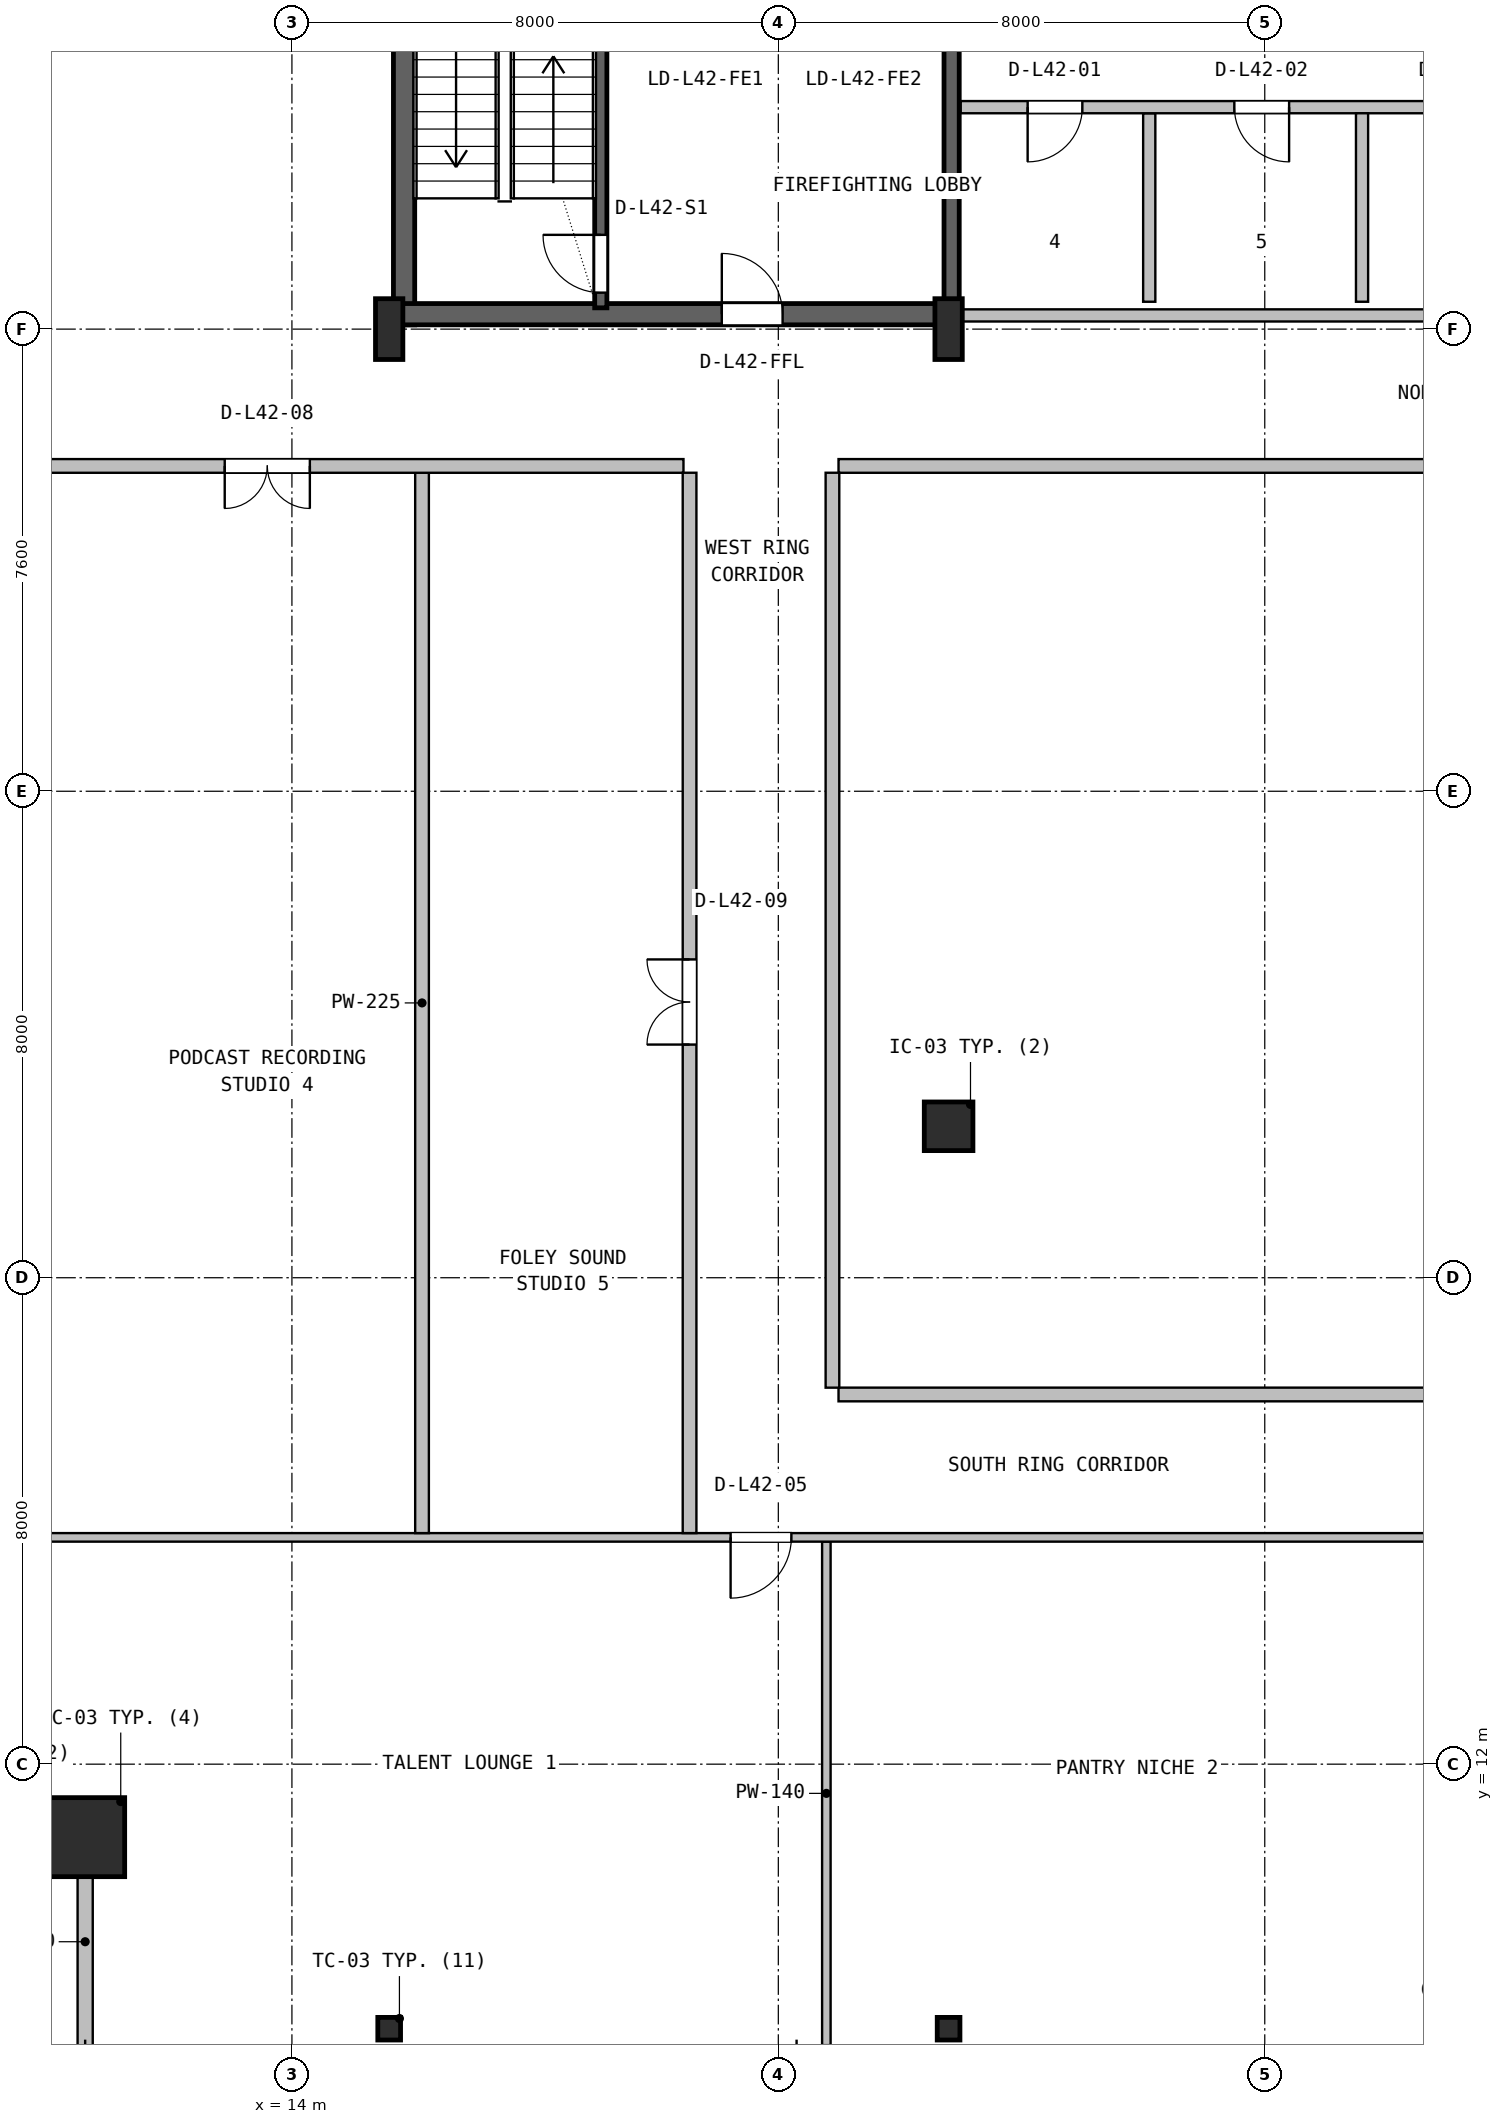
"""IFC4 building model, lengths in metres.
Left out: names, types, materials, properties, quantities, classifications, styles, units other than length and angle.
Written with IfcOpenShell. Run it as: python <this file> out.ifc"""

import sys

from ifc_helpers import new_model, si_unit, direction, frame, frame_2d, origin, origin_2d, place, context, subcontext, project, spatial, rectangle, hollow_rectangle, i_section, extrude, source, transform, mapped, element, fill, save


model = new_model("IFC4")
c1 = context("Model", 3, precision=1e-05, world=origin(), true_north=direction((0.0, 1.0)))
c2 = subcontext(c1, "Body", "Model", "MODEL_VIEW")
j1 = project(units=[si_unit("LENGTHUNIT", "METRE"), si_unit("PLANEANGLEUNIT", "RADIAN")], contexts=[c1])
p1 = place(None, origin())
s1 = spatial("IfcSite", under=j1, at=p1, CompositionType="ELEMENT")
p2 = place(p1, origin())
s2 = spatial("IfcBuilding", under=s1, at=p2, CompositionType="ELEMENT")
p3 = place(p2, frame((0.0, 0.0, 172.4)))
s3 = spatial("IfcBuildingStorey", under=s2, at=p3, CompositionType="ELEMENT", Elevation=172.4)
p4 = place(p3, frame((15.845, 35.67, 0.0), z_axis=(0.0, 0.0, 1.0), x_axis=(0.0, 1.0, 0.0)))
e1 = element("IfcWall", 1, at=p4, inside=s3, PredefinedType="SHEAR", context=c2, shape_type="SweptSolid", body=[
    extrude(rectangle(XDim=11.13, YDim=0.35, at=frame_2d((5.565, 0.0))), origin(), (0.0, 0.0, 1.0), 3.55),
])
p5 = place(p3, frame((15.67, 35.845, 0.0), z_axis=(0.0, 0.0, 1.0), x_axis=(1.0, 0.0, 0.0)))
e2 = element("IfcWall", 2, at=p5, inside=s3, PredefinedType="SHEAR", context=c2, shape_type="SweptSolid", body=[
    extrude(rectangle(XDim=9.13, YDim=0.35, at=frame_2d((4.565, 0.0))), origin(), (0.0, 0.0, 1.0), 3.55),
])
p6 = place(p5, frame((5.4, 0.0, 0.0)))
e3 = element("IfcOpeningElement", 3, at=p6, cuts=e2, PredefinedType="OPENING", context=c2, shape_type="SweptSolid", body=[
    extrude(rectangle(XDim=1.0, YDim=2.1, at=frame_2d((0.5, 1.05))), frame((0.0, 0.185, 0.0), z_axis=(0.0, -1.0, 0.0), x_axis=(1.0, 0.0, 0.0)), (0.0, 0.0, 1.0), 0.37),
])
m1 = source(origin(), c2, "Body", "SweptSolid", [
    extrude(i_section(OverallWidth=0.45, OverallDepth=1.0, WebThickness=0.016, FlangeThickness=0.03, FilletRadius=0.016, at=origin_2d()), origin(), (0.0, 0.0, 1.0), 3.8),
])
for number, where, z_axis, x_axis in (
    (4, (15.6, 35.6, 0.0), (0.0, 0.0, 1.0), (1.0, 0.0, 0.0)),
    (5, (24.8, 35.6, 0.0), (0.0, 0.0, 1.0), (1.0, 0.0, 0.0)),
):
    element("IfcColumn", number, at=place(p3, frame(where, z_axis=z_axis, x_axis=x_axis)), inside=s3, PredefinedType="COLUMN", context=c2, shape_type="MappedRepresentation", body=[
        mapped(m1, transform((0.0, 0.0, 0.0), x_axis=(1.0, 0.0, 0.0), y_axis=(0.0, 1.0, 0.0), z_axis=(0.0, 0.0, 1.0), scale=1.0)),
    ])
m2 = source(origin(), c2, "Body", "SweptSolid", [
    extrude(hollow_rectangle(XDim=1.3, YDim=1.3, WallThickness=0.05, at=origin_2d()), origin(), (0.0, 0.0, 1.0), 3.8),
])
p7 = place(p3, frame((10.6, 10.8, 0.0), z_axis=(0.0, 0.0, 1.0), x_axis=(1.0, 0.0, 0.0)))
e6 = element("IfcColumn", 6, at=p7, inside=s3, PredefinedType="COLUMN", context=c2, shape_type="MappedRepresentation", body=[
    mapped(m2, transform((0.0, 0.0, 0.0), x_axis=(1.0, 0.0, 0.0), y_axis=(0.0, 1.0, 0.0), z_axis=(0.0, 0.0, 1.0), scale=1.0)),
])
m3 = source(origin(), c2, "Body", "SweptSolid", [
    extrude(i_section(OverallWidth=0.374, OverallDepth=0.372, WebThickness=0.016, FlangeThickness=0.026, FilletRadius=0.016, at=origin_2d()), origin(), (0.0, 0.0, 1.0), 3.8),
])
for number, where, z_axis, x_axis in (
    (7, (15.6, 7.65, 0.0), (0.0, 0.0, 1.0), (1.0, 0.0, 0.0)),
    (8, (24.8, 7.65, 0.0), (0.0, 0.0, 1.0), (1.0, 0.0, 0.0)),
):
    element("IfcColumn", number, at=place(p3, frame(where, z_axis=z_axis, x_axis=x_axis)), inside=s3, PredefinedType="COLUMN", context=c2, shape_type="MappedRepresentation", body=[
        mapped(m3, transform((0.0, 0.0, 0.0), x_axis=(1.0, 0.0, 0.0), y_axis=(0.0, 1.0, 0.0), z_axis=(0.0, 0.0, 1.0), scale=1.0)),
    ])
m4 = source(origin(), c2, "Body", "SweptSolid", [
    extrude(rectangle(XDim=0.8, YDim=0.8, at=origin_2d()), origin(), (0.0, 0.0, 1.0), 3.8),
])
p8 = place(p3, frame((24.8, 22.49, 0.0), z_axis=(0.0, 0.0, 1.0), x_axis=(1.0, 0.0, 0.0)))
e9 = element("IfcColumn", 9, at=p8, inside=s3, PredefinedType="COLUMN", context=c2, shape_type="MappedRepresentation", body=[
    mapped(m4, transform((0.0, 0.0, 0.0), x_axis=(1.0, 0.0, 0.0), y_axis=(0.0, 1.0, 0.0), z_axis=(0.0, 0.0, 1.0), scale=1.0)),
])
p9 = place(p3, frame((10.6, 7.28, 0.0), z_axis=(0.0, 0.0, 1.0), x_axis=(0.0, 1.0, 0.0)))
e10 = element("IfcWall", 10, at=p9, inside=s3, PredefinedType="SOLIDWALL", context=c2, shape_type="SweptSolid", body=[
    extrude(rectangle(XDim=3.6, YDim=0.25, at=frame_2d((1.8, 0.0))), origin(), (0.0, 0.0, 1.0), 3.108),
])
p10 = place(p3, frame((19.08, 35.95, 0.0), z_axis=(0.0, 0.0, 1.0), x_axis=(0.0, 1.0, 0.0)))
e11 = element("IfcWall", 11, at=p10, inside=s3, PredefinedType="SHEAR", context=c2, shape_type="SweptSolid", body=[
    extrude(rectangle(XDim=9.65, YDim=0.2, at=frame_2d((4.825, 0.0))), origin(), (0.0, 0.0, 1.0), 3.55),
])
p11 = place(p10, frame((0.25, 0.0, 0.0)))
e12 = element("IfcOpeningElement", 12, at=p11, cuts=e11, PredefinedType="OPENING", context=c2, shape_type="SweptSolid", body=[
    extrude(rectangle(XDim=0.95, YDim=2.1, at=frame_2d((0.475, 1.05))), frame((0.0, 0.11, 0.0), z_axis=(0.0, -1.0, 0.0), x_axis=(1.0, 0.0, 0.0)), (0.0, 0.0, 1.0), 0.22),
])
p12 = place(p3, frame((24.85, 36.05, 0.0), z_axis=(0.0, 0.0, 1.0), x_axis=(0.0, 1.0, 0.0)))
e13 = element("IfcWall", 13, at=p12, inside=s3, PredefinedType="SHEAR", context=c2, shape_type="SweptSolid", body=[
    extrude(rectangle(XDim=10.45, YDim=0.25, at=frame_2d((5.225, 0.0))), origin(), (0.0, 0.0, 1.0), 3.55),
])
p13 = place(p3, frame((25.0, 35.825, 0.0), z_axis=(0.0, 0.0, 1.0), x_axis=(1.0, 0.0, 0.0)))
e14 = element("IfcWall", 14, at=p13, inside=s3, PredefinedType="SOLIDWALL", context=c2, shape_type="SweptSolid", body=[
    extrude(rectangle(XDim=12.95, YDim=0.2, at=frame_2d((6.475, 0.0))), origin(), (0.0, 0.0, 1.0), 2.575),
])
p14 = place(p3, frame((28.1, 36.05, 0.0), z_axis=(0.0, 0.0, 1.0), x_axis=(0.0, 1.0, 0.0)))
e15 = element("IfcWall", 15, at=p14, inside=s3, PredefinedType="PLUMBINGWALL", context=c2, shape_type="SweptSolid", body=[
    extrude(rectangle(XDim=3.1, YDim=0.2, at=frame_2d((1.55, 0.0))), origin(), (0.0, 0.0, 1.0), 3.53),
])
p15 = place(p3, frame((25.0, 39.25, 0.0), z_axis=(0.0, 0.0, 1.0), x_axis=(1.0, 0.0, 0.0)))
e16 = element("IfcWall", 16, at=p15, inside=s3, PredefinedType="SOLIDWALL", context=c2, shape_type="SweptSolid", body=[
    extrude(rectangle(XDim=12.95, YDim=0.2, at=frame_2d((6.475, 0.0))), origin(), (0.0, 0.0, 1.0), 3.53),
])
p16 = place(p15, frame((1.1, 0.0, 0.0)))
e17 = element("IfcOpeningElement", 17, at=p16, cuts=e16, PredefinedType="OPENING", context=c2, shape_type="SweptSolid", body=[
    extrude(rectangle(XDim=0.9, YDim=2.06, at=frame_2d((0.45, 1.03))), frame((0.0, 0.11, 0.0), z_axis=(0.0, -1.0, 0.0), x_axis=(1.0, 0.0, 0.0)), (0.0, 0.0, 1.0), 0.22),
])
p17 = place(p15, frame((4.5, 0.0, 0.0)))
e18 = element("IfcOpeningElement", 18, at=p17, cuts=e16, PredefinedType="OPENING", context=c2, shape_type="SweptSolid", body=[
    extrude(rectangle(XDim=0.9, YDim=2.06, at=frame_2d((0.45, 1.03))), frame((0.0, 0.11, 0.0), z_axis=(0.0, -1.0, 0.0), x_axis=(1.0, 0.0, 0.0)), (0.0, 0.0, 1.0), 0.22),
])
p18 = place(p15, frame((7.84, 0.0, 0.0)))
e19 = element("IfcOpeningElement", 19, at=p18, cuts=e16, PredefinedType="OPENING", context=c2, shape_type="SweptSolid", body=[
    extrude(rectangle(XDim=0.92, YDim=2.08, at=frame_2d((0.46, 1.04))), frame((0.0, 0.11, 0.0), z_axis=(0.0, -1.0, 0.0), x_axis=(1.0, 0.0, 0.0)), (0.0, 0.0, 1.0), 0.22),
])
p19 = place(p15, frame((10.875, 0.0, 0.0)))
e20 = element("IfcOpeningElement", 20, at=p19, cuts=e16, PredefinedType="OPENING", context=c2, shape_type="SweptSolid", body=[
    extrude(rectangle(XDim=1.2, YDim=2.1, at=frame_2d((0.6, 1.05))), frame((0.0, 0.11, 0.0), z_axis=(0.0, -1.0, 0.0), x_axis=(1.0, 0.0, 0.0)), (0.0, 0.0, 1.0), 0.22),
])
p20 = place(p3, frame((31.6, 36.05, 0.0), z_axis=(0.0, 0.0, 1.0), x_axis=(0.0, 1.0, 0.0)))
e21 = element("IfcWall", 21, at=p20, inside=s3, PredefinedType="PLUMBINGWALL", context=c2, shape_type="SweptSolid", body=[
    extrude(rectangle(XDim=3.1, YDim=0.2, at=frame_2d((1.55, 0.0))), origin(), (0.0, 0.0, 1.0), 3.53),
])
p21 = place(p3, frame((22.79, 7.38, 0.0), z_axis=(0.0, 0.0, 1.0), x_axis=(0.0, 1.0, 0.0)))
e22 = element("IfcWall", 22, at=p21, inside=s3, PredefinedType="PARTITIONING", context=c2, shape_type="SweptSolid", body=[
    extrude(rectangle(XDim=8.28, YDim=0.14, at=frame_2d((4.14, 0.0))), origin(), (0.0, 0.0, 1.0), 3.108),
])
p22 = place(p3, frame((7.18, 15.73, 0.0), z_axis=(0.0, 0.0, 1.0), x_axis=(1.0, 0.0, 0.0)))
e23 = element("IfcWall", 23, at=p22, inside=s3, PredefinedType="PARTITIONING", context=c2, shape_type="SweptSolid", body=[
    extrude(rectangle(XDim=53.64, YDim=0.14, at=frame_2d((26.82, 0.0))), origin(), (0.0, 0.0, 1.0), 2.909),
])
p23 = place(p22, frame((14.035, 0.0, 0.0)))
e24 = element("IfcOpeningElement", 24, at=p23, cuts=e23, PredefinedType="OPENING", context=c2, shape_type="SweptSolid", body=[
    extrude(rectangle(XDim=1.0, YDim=2.1, at=frame_2d((0.5, 1.05))), frame((0.0, 0.08, 0.0), z_axis=(0.0, -1.0, 0.0), x_axis=(1.0, 0.0, 0.0)), (0.0, 0.0, 1.0), 0.16),
])
p24 = place(p22, frame((26.115, 0.0, 0.0)))
e25 = element("IfcOpeningElement", 25, at=p24, cuts=e23, PredefinedType="OPENING", context=c2, shape_type="SweptSolid", body=[
    extrude(rectangle(XDim=0.88, YDim=2.06, at=frame_2d((0.44, 1.03))), frame((0.0, 0.08, 0.0), z_axis=(0.0, -1.0, 0.0), x_axis=(1.0, 0.0, 0.0)), (0.0, 0.0, 1.0), 0.16),
])
p25 = place(p22, frame((38.05, 0.0, 0.0)))
e26 = element("IfcOpeningElement", 26, at=p25, cuts=e23, PredefinedType="OPENING", context=c2, shape_type="SweptSolid", body=[
    extrude(rectangle(XDim=1.05, YDim=2.1, at=frame_2d((0.525, 1.05))), frame((0.0, 0.08, 0.0), z_axis=(0.0, -1.0, 0.0), x_axis=(1.0, 0.0, 0.0)), (0.0, 0.0, 1.0), 0.16),
])
p26 = place(p3, frame((16.14, 15.8, 0.0), z_axis=(0.0, 0.0, 1.0), x_axis=(0.0, 1.0, 0.0)))
e27 = element("IfcWall", 27, at=p26, inside=s3, PredefinedType="PARTITIONING", context=c2, shape_type="SweptSolid", body=[
    extrude(rectangle(XDim=17.438, YDim=0.225, at=frame_2d((8.719, 0.0))), origin(), (0.0, 0.0, 1.0), 3.222),
])
p27 = place(p3, frame((7.18, 33.35, 0.0), z_axis=(0.0, 0.0, 1.0), x_axis=(1.0, 0.0, 0.0)))
e28 = element("IfcWall", 28, at=p27, inside=s3, PredefinedType="PARTITIONING", context=c2, shape_type="SweptSolid", body=[
    extrude(rectangle(XDim=13.26, YDim=0.225, at=frame_2d((6.63, 0.0))), origin(), (0.0, 0.0, 1.0), 3.108),
])
p28 = place(p27, frame((5.715, 0.0, 0.0)))
e29 = element("IfcOpeningElement", 29, at=p28, cuts=e28, PredefinedType="OPENING", context=c2, shape_type="SweptSolid", body=[
    extrude(rectangle(XDim=1.4, YDim=2.12, at=frame_2d((0.7, 1.06))), frame((0.0, 0.123, 0.0), z_axis=(0.0, -1.0, 0.0), x_axis=(1.0, 0.0, 0.0)), (0.0, 0.0, 1.0), 0.245),
])
p29 = place(p3, frame((20.54, 15.8, 0.0), z_axis=(0.0, 0.0, 1.0), x_axis=(0.0, 1.0, 0.0)))
e30 = element("IfcWall", 30, at=p29, inside=s3, PredefinedType="PARTITIONING", context=c2, shape_type="SweptSolid", body=[
    extrude(rectangle(XDim=17.438, YDim=0.225, at=frame_2d((8.719, 0.0))), origin(), (0.0, 0.0, 1.0), 3.222),
])
p30 = place(p29, frame((8.034, 0.0, 0.0)))
e31 = element("IfcOpeningElement", 31, at=p30, cuts=e30, PredefinedType="OPENING", context=c2, shape_type="SweptSolid", body=[
    extrude(rectangle(XDim=1.4, YDim=2.12, at=frame_2d((0.7, 1.06))), frame((0.0, 0.123, 0.0), z_axis=(0.0, -1.0, 0.0), x_axis=(1.0, 0.0, 0.0)), (0.0, 0.0, 1.0), 0.245),
])
p31 = place(p3, frame((22.99, 18.08, 0.0), z_axis=(0.0, 0.0, 1.0), x_axis=(1.0, 0.0, 0.0)))
e32 = element("IfcWall", 32, at=p31, inside=s3, PredefinedType="PARTITIONING", context=c2, shape_type="SweptSolid", body=[
    extrude(rectangle(XDim=21.49, YDim=0.225, at=frame_2d((10.745, 0.0))), origin(), (0.0, 0.0, 1.0), 2.909),
])
p32 = place(p31, frame((10.045, 0.0, 0.0)))
e33 = element("IfcOpeningElement", 33, at=p32, cuts=e32, PredefinedType="OPENING", context=c2, shape_type="SweptSolid", body=[
    extrude(rectangle(XDim=1.4, YDim=2.12, at=frame_2d((0.7, 1.06))), frame((0.0, 0.123, 0.0), z_axis=(0.0, -1.0, 0.0), x_axis=(1.0, 0.0, 0.0)), (0.0, 0.0, 1.0), 0.245),
])
p33 = place(p3, frame((22.99, 33.35, 0.0), z_axis=(0.0, 0.0, 1.0), x_axis=(1.0, 0.0, 0.0)))
e34 = element("IfcWall", 34, at=p33, inside=s3, PredefinedType="PARTITIONING", context=c2, shape_type="SweptSolid", body=[
    extrude(rectangle(XDim=21.49, YDim=0.225, at=frame_2d((10.745, 0.0))), origin(), (0.0, 0.0, 1.0), 2.909),
])
p34 = place(p3, frame((22.89, 18.192, 0.0), z_axis=(0.0, 0.0, 1.0), x_axis=(0.0, 1.0, 0.0)))
e35 = element("IfcWall", 35, at=p34, inside=s3, PredefinedType="PARTITIONING", context=c2, shape_type="SweptSolid", body=[
    extrude(rectangle(XDim=15.046, YDim=0.225, at=frame_2d((7.523, 0.0))), origin(), (0.0, 0.0, 1.0), 3.222),
])
m5 = source(origin(), c2, "Body", "SweptSolid", [
    extrude(rectangle(XDim=0.95, YDim=2.1, at=frame_2d((0.475, 1.05))), frame((0.0, 0.025, 0.0), z_axis=(0.0, -1.0, 0.0), x_axis=(1.0, 0.0, 0.0)), (0.0, 0.0, 1.0), 0.05),
])
p35 = place(p11, origin())
e36 = element("IfcDoor", 36, at=p35, inside=s3, OperationType="SINGLE_SWING_RIGHT", PredefinedType="DOOR", context=c2, shape_type="MappedRepresentation", body=[
    mapped(m5, transform((0.0, 0.0, 0.0), x_axis=(1.0, 0.0, 0.0), y_axis=(0.0, 1.0, 0.0), z_axis=(0.0, 0.0, 1.0), scale=1.0)),
])
fill(e12, e36)
m6 = source(origin(), c2, "Body", "SweptSolid", [
    extrude(rectangle(XDim=1.0, YDim=2.1, at=frame_2d((0.5, 1.05))), frame((0.0, 0.025, 0.0), z_axis=(0.0, -1.0, 0.0), x_axis=(1.0, 0.0, 0.0)), (0.0, 0.0, 1.0), 0.05),
])
p36 = place(p6, origin())
e37 = element("IfcDoor", 37, at=p36, inside=s3, OperationType="SINGLE_SWING_LEFT", PredefinedType="DOOR", context=c2, shape_type="MappedRepresentation", body=[
    mapped(m6, transform((0.0, 0.0, 0.0), x_axis=(1.0, 0.0, 0.0), y_axis=(0.0, 1.0, 0.0), z_axis=(0.0, 0.0, 1.0), scale=1.0)),
])
fill(e3, e37)
m7 = source(origin(), c2, "Body", "SweptSolid", [
    extrude(rectangle(XDim=0.9, YDim=2.06, at=frame_2d((0.45, 1.03))), frame((0.0, 0.025, 0.0), z_axis=(0.0, -1.0, 0.0), x_axis=(1.0, 0.0, 0.0)), (0.0, 0.0, 1.0), 0.05),
])
p37 = place(p16, frame((0.9, 0.0, 0.0), z_axis=(0.0, 0.0, 1.0), x_axis=(-1.0, 0.0, 0.0)))
e38 = element("IfcDoor", 38, at=p37, inside=s3, OperationType="SINGLE_SWING_LEFT", PredefinedType="DOOR", context=c2, shape_type="MappedRepresentation", body=[
    mapped(m7, transform((0.0, 0.0, 0.0), x_axis=(1.0, 0.0, 0.0), y_axis=(0.0, 1.0, 0.0), z_axis=(0.0, 0.0, 1.0), scale=1.0)),
])
fill(e17, e38)
p38 = place(p17, frame((0.9, 0.0, 0.0), z_axis=(0.0, 0.0, 1.0), x_axis=(-1.0, 0.0, 0.0)))
e39 = element("IfcDoor", 39, at=p38, inside=s3, OperationType="SINGLE_SWING_RIGHT", PredefinedType="DOOR", context=c2, shape_type="MappedRepresentation", body=[
    mapped(m7, transform((0.0, 0.0, 0.0), x_axis=(1.0, 0.0, 0.0), y_axis=(0.0, 1.0, 0.0), z_axis=(0.0, 0.0, 1.0), scale=1.0)),
])
fill(e18, e39)
m8 = source(origin(), c2, "Body", "SweptSolid", [
    extrude(rectangle(XDim=1.0, YDim=2.1, at=frame_2d((0.5, 1.05))), frame((0.0, 0.025, 0.0), z_axis=(0.0, -1.0, 0.0), x_axis=(1.0, 0.0, 0.0)), (0.0, 0.0, 1.0), 0.05),
])
p39 = place(p23, frame((1.0, 0.0, 0.0), z_axis=(0.0, 0.0, 1.0), x_axis=(-1.0, 0.0, 0.0)))
e40 = element("IfcDoor", 40, at=p39, inside=s3, OperationType="SINGLE_SWING_LEFT", PredefinedType="DOOR", context=c2, shape_type="MappedRepresentation", body=[
    mapped(m8, transform((0.0, 0.0, 0.0), x_axis=(1.0, 0.0, 0.0), y_axis=(0.0, 1.0, 0.0), z_axis=(0.0, 0.0, 1.0), scale=1.0)),
])
fill(e24, e40)
m9 = source(origin(), c2, "Body", "SweptSolid", [
    extrude(rectangle(XDim=1.4, YDim=2.12, at=frame_2d((0.7, 1.06))), frame((0.0, 0.025, 0.0), z_axis=(0.0, -1.0, 0.0), x_axis=(1.0, 0.0, 0.0)), (0.0, 0.0, 1.0), 0.05),
])
p40 = place(p28, frame((1.4, 0.0, 0.0), z_axis=(0.0, 0.0, 1.0), x_axis=(-1.0, 0.0, 0.0)))
e41 = element("IfcDoor", 41, at=p40, inside=s3, OperationType="DOUBLE_DOOR_SINGLE_SWING", PredefinedType="DOOR", context=c2, shape_type="MappedRepresentation", body=[
    mapped(m9, transform((0.0, 0.0, 0.0), x_axis=(1.0, 0.0, 0.0), y_axis=(0.0, 1.0, 0.0), z_axis=(0.0, 0.0, 1.0), scale=1.0)),
])
fill(e29, e41)
p41 = place(p30, origin())
e42 = element("IfcDoor", 42, at=p41, inside=s3, OperationType="DOUBLE_DOOR_SINGLE_SWING", PredefinedType="DOOR", context=c2, shape_type="MappedRepresentation", body=[
    mapped(m9, transform((0.0, 0.0, 0.0), x_axis=(1.0, 0.0, 0.0), y_axis=(0.0, 1.0, 0.0), z_axis=(0.0, 0.0, 1.0), scale=1.0)),
])
fill(e31, e42)
save(model, sys.argv[1])
